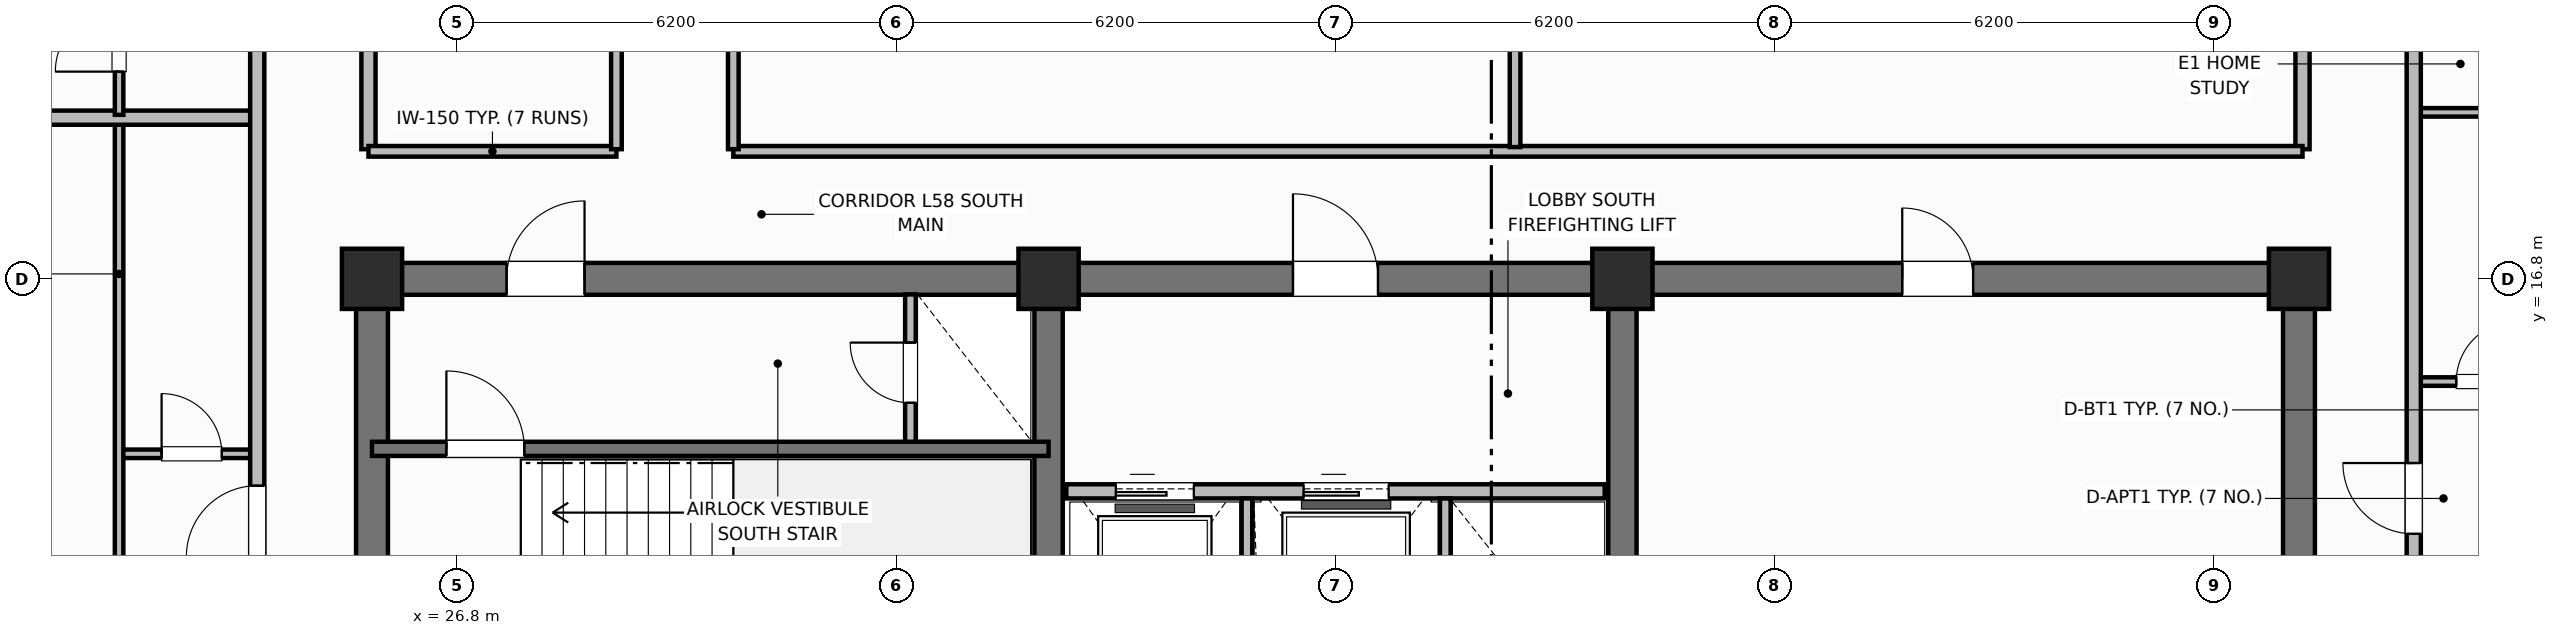
"""IFC4 building model, lengths in metres.
Left out: names, types, materials, properties, quantities, classifications, styles, units other than length and angle.
Written with IfcOpenShell. Run it as: python <this file> out.ifc"""

import sys

from ifc_helpers import new_model, si_unit, direction, frame, frame_2d, origin, origin_2d, place, context, subcontext, project, spatial, rectangle, extrude, element, fill, save


model = new_model("IFC4")
c1 = context("Model", 3, precision=1e-05, world=origin(), true_north=direction((0.0, 1.0)))
c2 = subcontext(c1, "Body", "Model", "MODEL_VIEW")
j1 = project(units=[si_unit("LENGTHUNIT", "METRE"), si_unit("PLANEANGLEUNIT", "RADIAN")], contexts=[c1])
p1 = place(None, origin())
s1 = spatial("IfcSite", under=j1, at=p1, CompositionType="ELEMENT")
p2 = place(p1, origin())
s2 = spatial("IfcBuilding", under=s1, at=p2, CompositionType="ELEMENT")
p3 = place(p2, frame((0.0, 0.0, 233.2)))
s3 = spatial("IfcBuildingStorey", under=s2, at=p3, CompositionType="ELEMENT", Elevation=233.2)
for number, where, z_axis, x_axis in (
    (1, (25.6, 10.825, 0.0), (0.0, 0.0, 1.0), (0.0, 1.0, 0.0)),
    (2, (52.8, 10.825, 0.0), (0.0, 0.0, 1.0), (0.0, 1.0, 0.0)),
):
    element("IfcWall", number, at=place(p3, frame(where, z_axis=z_axis, x_axis=x_axis)), inside=s3, PredefinedType="SHEAR", context=c2, shape_type="SweptSolid", body=[
        extrude(rectangle(XDim=5.75, YDim=0.45, at=frame_2d((2.875, 0.0))), origin(), (0.0, 0.0, 1.0), 3.7),
    ])
p4 = place(p3, frame((25.6, 16.8, 0.0), z_axis=(0.0, 0.0, 1.0), x_axis=(1.0, 0.0, 0.0)))
e3 = element("IfcWall", 3, at=p4, inside=s3, PredefinedType="SHEAR", context=c2, shape_type="SweptSolid", body=[
    extrude(rectangle(XDim=27.2, YDim=0.45, at=frame_2d((13.6, 0.0))), origin(), (0.0, 0.0, 1.0), 3.7),
])
p5 = place(p4, frame((1.9, 0.0, 0.0)))
e4 = element("IfcOpeningElement", 4, at=p5, cuts=e3, PredefinedType="OPENING", context=c2, shape_type="SweptSolid", body=[
    extrude(rectangle(XDim=1.1, YDim=2.15, at=frame_2d((0.55, 1.075))), frame((0.0, 0.235, 0.0), z_axis=(0.0, -1.0, 0.0), x_axis=(1.0, 0.0, 0.0)), (0.0, 0.0, 1.0), 0.47),
])
p6 = place(p4, frame((13.0, 0.0, 0.0)))
e5 = element("IfcOpeningElement", 5, at=p6, cuts=e3, PredefinedType="OPENING", context=c2, shape_type="SweptSolid", body=[
    extrude(rectangle(XDim=1.2, YDim=2.15, at=frame_2d((0.6, 1.075))), frame((0.0, 0.235, 0.0), z_axis=(0.0, -1.0, 0.0), x_axis=(1.0, 0.0, 0.0)), (0.0, 0.0, 1.0), 0.47),
])
p7 = place(p4, frame((21.6, 0.0, 0.0)))
e6 = element("IfcOpeningElement", 6, at=p7, cuts=e3, PredefinedType="OPENING", context=c2, shape_type="SweptSolid", body=[
    extrude(rectangle(XDim=1.0, YDim=2.15, at=frame_2d((0.5, 1.075))), frame((0.0, 0.235, 0.0), z_axis=(0.0, -1.0, 0.0), x_axis=(1.0, 0.0, 0.0)), (0.0, 0.0, 1.0), 0.47),
])
for number, where, z_axis, x_axis in (
    (7, (35.15, 10.825, 0.0), (0.0, 0.0, 1.0), (0.0, 1.0, 0.0)),
    (8, (43.25, 10.825, 0.0), (0.0, 0.0, 1.0), (0.0, 1.0, 0.0)),
):
    element("IfcWall", number, at=place(p3, frame(where, z_axis=z_axis, x_axis=x_axis)), inside=s3, PredefinedType="SHEAR", context=c2, shape_type="SweptSolid", body=[
        extrude(rectangle(XDim=5.75, YDim=0.4, at=frame_2d((2.875, 0.0))), origin(), (0.0, 0.0, 1.0), 3.7),
    ])
for number, where, z_axis, x_axis in (
    (9, (25.6, 16.8, 0.0), (0.0, 0.0, 1.0), (1.0, 0.0, 0.0)),
    (10, (35.15, 16.8, 0.0), (0.0, 0.0, 1.0), (1.0, 0.0, 0.0)),
    (11, (43.25, 16.8, 0.0), (0.0, 0.0, 1.0), (1.0, 0.0, 0.0)),
    (12, (52.8, 16.8, 0.0), (0.0, 0.0, 1.0), (1.0, 0.0, 0.0)),
):
    element("IfcColumn", number, at=place(p3, frame(where, z_axis=z_axis, x_axis=x_axis)), inside=s3, PredefinedType="COLUMN", context=c2, shape_type="SweptSolid", body=[
        extrude(rectangle(XDim=0.85, YDim=0.85, at=origin_2d()), origin(), (0.0, 0.0, 1.0), 3.7),
    ])
p8 = place(p3, frame((25.6, 14.4, 0.0), z_axis=(0.0, 0.0, 1.0), x_axis=(1.0, 0.0, 0.0)))
e13 = element("IfcWall", 13, at=p8, inside=s3, PredefinedType="SHEAR", context=c2, shape_type="SweptSolid", body=[
    extrude(rectangle(XDim=9.55, YDim=0.2, at=frame_2d((4.775, 0.0))), origin(), (0.0, 0.0, 1.0), 3.7),
])
p9 = place(p8, frame((1.05, 0.0, 0.0)))
e14 = element("IfcOpeningElement", 14, at=p9, cuts=e13, PredefinedType="OPENING", context=c2, shape_type="SweptSolid", body=[
    extrude(rectangle(XDim=1.1, YDim=2.15, at=frame_2d((0.55, 1.075))), frame((0.0, 0.11, 0.0), z_axis=(0.0, -1.0, 0.0), x_axis=(1.0, 0.0, 0.0)), (0.0, 0.0, 1.0), 0.22),
])
p10 = place(p3, frame((33.2, 14.5, 0.0), z_axis=(0.0, 0.0, 1.0), x_axis=(0.0, 1.0, 0.0)))
e15 = element("IfcWall", 15, at=p10, inside=s3, PredefinedType="PARTITIONING", context=c2, shape_type="SweptSolid", body=[
    extrude(rectangle(XDim=2.08, YDim=0.15, at=frame_2d((1.04, 0.0))), origin(), (0.0, 0.0, 1.0), 2.56),
])
p11 = place(p10, frame((0.55, 0.0, 0.0)))
e16 = element("IfcOpeningElement", 16, at=p11, cuts=e15, PredefinedType="OPENING", context=c2, shape_type="SweptSolid", body=[
    extrude(rectangle(XDim=0.85, YDim=2.05, at=frame_2d((0.425, 1.025))), frame((0.0, 0.085, 0.0), z_axis=(0.0, -1.0, 0.0), x_axis=(1.0, 0.0, 0.0)), (0.0, 0.0, 1.0), 0.17),
])
p12 = place(p3, frame((35.4, 13.8, 0.0), z_axis=(0.0, 0.0, 1.0), x_axis=(1.0, 0.0, 0.0)))
e17 = element("IfcWall", 17, at=p12, inside=s3, PredefinedType="PARTITIONING", context=c2, shape_type="SweptSolid", body=[
    extrude(rectangle(XDim=7.6, YDim=0.2, at=frame_2d((3.8, 0.0))), origin(), (0.0, 0.0, 1.0), 2.33),
])
p13 = place(p12, frame((0.7, 0.0, 0.0)))
e18 = element("IfcOpeningElement", 18, at=p13, cuts=e17, PredefinedType="OPENING", context=c2, shape_type="SweptSolid", body=[
    extrude(rectangle(XDim=1.1, YDim=2.15, at=frame_2d((0.55, 1.075))), frame((0.0, 0.11, 0.0), z_axis=(0.0, -1.0, 0.0), x_axis=(1.0, 0.0, 0.0)), (0.0, 0.0, 1.0), 0.22),
])
p14 = place(p12, frame((3.35, 0.0, 0.0)))
e19 = element("IfcOpeningElement", 19, at=p14, cuts=e17, PredefinedType="OPENING", context=c2, shape_type="SweptSolid", body=[
    extrude(rectangle(XDim=1.2, YDim=2.15, at=frame_2d((0.6, 1.075))), frame((0.0, 0.11, 0.0), z_axis=(0.0, -1.0, 0.0), x_axis=(1.0, 0.0, 0.0)), (0.0, 0.0, 1.0), 0.22),
])
for number, where, z_axis, x_axis in (
    (20, (37.95, 10.95, 0.0), (0.0, 0.0, 1.0), (0.0, 1.0, 0.0)),
    (21, (40.75, 10.95, 0.0), (0.0, 0.0, 1.0), (0.0, 1.0, 0.0)),
):
    element("IfcWall", number, at=place(p3, frame(where, z_axis=z_axis, x_axis=x_axis)), inside=s3, PredefinedType="PARTITIONING", context=c2, shape_type="SweptSolid", body=[
        extrude(rectangle(XDim=2.75, YDim=0.15, at=frame_2d((1.375, 0.0))), origin(), (0.0, 0.0, 1.0), 2.56),
    ])
for number, where, z_axis, x_axis in (
    (22, (25.55, 18.63, 0.0), (0.0, 0.0, 1.0), (0.0, 1.0, 0.0)),
    (23, (52.85, 18.63, 0.0), (0.0, 0.0, 1.0), (0.0, 1.0, 0.0)),
):
    element("IfcWall", number, at=place(p3, frame(where, z_axis=z_axis, x_axis=x_axis)), inside=s3, PredefinedType="PARTITIONING", context=c2, shape_type="SweptSolid", body=[
        extrude(rectangle(XDim=19.14, YDim=0.2, at=frame_2d((9.57, 0.0))), origin(), (0.0, 0.0, 1.0), 2.56),
    ])
p15 = place(p3, frame((25.55, 18.6, 0.0), z_axis=(0.0, 0.0, 1.0), x_axis=(1.0, 0.0, 0.0)))
e24 = element("IfcWall", 24, at=p15, inside=s3, PredefinedType="PARTITIONING", context=c2, shape_type="SweptSolid", body=[
    extrude(rectangle(XDim=3.5, YDim=0.15, at=frame_2d((1.75, 0.0))), origin(), (0.0, 0.0, 1.0), 2.56),
])
p16 = place(p3, frame((30.7, 18.6, 0.0), z_axis=(0.0, 0.0, 1.0), x_axis=(1.0, 0.0, 0.0)))
e25 = element("IfcWall", 25, at=p16, inside=s3, PredefinedType="PARTITIONING", context=c2, shape_type="SweptSolid", body=[
    extrude(rectangle(XDim=22.15, YDim=0.15, at=frame_2d((11.075, 0.0))), origin(), (0.0, 0.0, 1.0), 2.56),
])
p17 = place(p3, frame((41.735, 18.66, 0.0), z_axis=(0.0, 0.0, 1.0), x_axis=(0.0, 1.0, 0.0)))
e26 = element("IfcWall", 26, at=p17, inside=s3, PredefinedType="PARTITIONING", context=c2, shape_type="SweptSolid", body=[
    extrude(rectangle(XDim=19.08, YDim=0.15, at=frame_2d((9.54, 0.0))), origin(), (0.0, 0.0, 1.0), 2.56),
])
p18 = place(p17, frame((6.5, 0.0, 0.0)))
e27 = element("IfcOpeningElement", 27, at=p18, cuts=e26, PredefinedType="OPENING", context=c2, shape_type="SweptSolid", body=[
    extrude(rectangle(XDim=1.0, YDim=2.15, at=frame_2d((0.5, 1.075))), frame((0.0, 0.085, 0.0), z_axis=(0.0, -1.0, 0.0), x_axis=(1.0, 0.0, 0.0)), (0.0, 0.0, 1.0), 0.17),
])
p19 = place(p3, frame((29.05, 18.63, 0.0), z_axis=(0.0, 0.0, 1.0), x_axis=(0.0, 1.0, 0.0)))
e28 = element("IfcWall", 28, at=p19, inside=s3, PredefinedType="PARTITIONING", context=c2, shape_type="SweptSolid", body=[
    extrude(rectangle(XDim=19.14, YDim=0.15, at=frame_2d((9.57, 0.0))), origin(), (0.0, 0.0, 1.0), 2.56),
])
p20 = place(p19, frame((5.5, 0.0, 0.0)))
e29 = element("IfcOpeningElement", 29, at=p20, cuts=e28, PredefinedType="OPENING", context=c2, shape_type="SweptSolid", body=[
    extrude(rectangle(XDim=1.0, YDim=2.15, at=frame_2d((0.5, 1.075))), frame((0.0, 0.085, 0.0), z_axis=(0.0, -1.0, 0.0), x_axis=(1.0, 0.0, 0.0)), (0.0, 0.0, 1.0), 0.17),
])
p21 = place(p3, frame((30.7, 18.63, 0.0), z_axis=(0.0, 0.0, 1.0), x_axis=(0.0, 1.0, 0.0)))
e30 = element("IfcWall", 30, at=p21, inside=s3, PredefinedType="PARTITIONING", context=c2, shape_type="SweptSolid", body=[
    extrude(rectangle(XDim=19.14, YDim=0.15, at=frame_2d((9.57, 0.0))), origin(), (0.0, 0.0, 1.0), 2.56),
])
p22 = place(p21, frame((5.5, 0.0, 0.0)))
e31 = element("IfcOpeningElement", 31, at=p22, cuts=e30, PredefinedType="OPENING", context=c2, shape_type="SweptSolid", body=[
    extrude(rectangle(XDim=1.0, YDim=2.15, at=frame_2d((0.5, 1.075))), frame((0.0, 0.085, 0.0), z_axis=(0.0, -1.0, 0.0), x_axis=(1.0, 0.0, 0.0)), (0.0, 0.0, 1.0), 0.17),
])
p23 = place(p3, frame((22.03, 14.33, 0.0), z_axis=(0.0, 0.0, 1.0), x_axis=(1.0, 0.0, 0.0)))
e32 = element("IfcWall", 32, at=p23, inside=s3, PredefinedType="PARTITIONING", context=c2, shape_type="SweptSolid", body=[
    extrude(rectangle(XDim=1.95, YDim=0.12, at=frame_2d((0.975, 0.0))), origin(), (0.0, 0.0, 1.0), 2.56),
])
p24 = place(p23, frame((0.6, 0.0, 0.0)))
e33 = element("IfcOpeningElement", 33, at=p24, cuts=e32, PredefinedType="OPENING", context=c2, shape_type="SweptSolid", body=[
    extrude(rectangle(XDim=0.85, YDim=2.1, at=frame_2d((0.425, 1.05))), frame((0.0, 0.07, 0.0), z_axis=(0.0, -1.0, 0.0), x_axis=(1.0, 0.0, 0.0)), (0.0, 0.0, 1.0), 0.14),
])
p25 = place(p3, frame((22.03, 9.99, 0.0), z_axis=(0.0, 0.0, 1.0), x_axis=(0.0, 1.0, 0.0)))
e34 = element("IfcWall", 34, at=p25, inside=s3, PredefinedType="PARTITIONING", context=c2, shape_type="SweptSolid", body=[
    extrude(rectangle(XDim=9.045, YDim=0.12, at=frame_2d((4.522, 0.0))), origin(), (0.0, 0.0, 1.0), 2.56),
])
p26 = place(p25, frame((0.41, 0.0, 0.0)))
e35 = element("IfcOpeningElement", 35, at=p26, cuts=e34, PredefinedType="OPENING", context=c2, shape_type="SweptSolid", body=[
    extrude(rectangle(XDim=0.9, YDim=2.1, at=frame_2d((0.45, 1.05))), frame((0.0, 0.07, 0.0), z_axis=(0.0, -1.0, 0.0), x_axis=(1.0, 0.0, 0.0)), (0.0, 0.0, 1.0), 0.14),
])
p27 = place(p3, frame((19.53, 19.075, 0.0), z_axis=(0.0, 0.0, 1.0), x_axis=(1.0, 0.0, 0.0)))
e36 = element("IfcWall", 36, at=p27, inside=s3, PredefinedType="PARTITIONING", context=c2, shape_type="SweptSolid", body=[
    extrude(rectangle(XDim=4.45, YDim=0.2, at=frame_2d((2.225, 0.0))), origin(), (0.0, 0.0, 1.0), 2.56),
])
p28 = place(p3, frame((22.03, 19.115, 0.0), z_axis=(0.0, 0.0, 1.0), x_axis=(0.0, 1.0, 0.0)))
e37 = element("IfcWall", 37, at=p28, inside=s3, PredefinedType="PARTITIONING", context=c2, shape_type="SweptSolid", body=[
    extrude(rectangle(XDim=5.42, YDim=0.12, at=frame_2d((2.71, 0.0))), origin(), (0.0, 0.0, 1.0), 2.56),
])
p29 = place(p28, frame((0.61, 0.0, 0.0)))
e38 = element("IfcOpeningElement", 38, at=p29, cuts=e37, PredefinedType="OPENING", context=c2, shape_type="SweptSolid", body=[
    extrude(rectangle(XDim=0.9, YDim=2.1, at=frame_2d((0.45, 1.05))), frame((0.0, 0.07, 0.0), z_axis=(0.0, -1.0, 0.0), x_axis=(1.0, 0.0, 0.0)), (0.0, 0.0, 1.0), 0.14),
])
p30 = place(p3, frame((23.98, 9.95, 0.0), z_axis=(0.0, 0.0, 1.0), x_axis=(0.0, 1.0, 0.0)))
e39 = element("IfcWall", 39, at=p30, inside=s3, PredefinedType="PARTITIONING", context=c2, shape_type="SweptSolid", body=[
    extrude(rectangle(XDim=36.5, YDim=0.2, at=frame_2d((18.25, 0.0))), origin(), (0.0, 0.0, 1.0), 2.56),
])
p31 = place(p30, frame((2.93, 0.0, 0.0)))
e40 = element("IfcOpeningElement", 40, at=p31, cuts=e39, PredefinedType="OPENING", context=c2, shape_type="SweptSolid", body=[
    extrude(rectangle(XDim=1.0, YDim=2.15, at=frame_2d((0.5, 1.075))), frame((0.0, 0.11, 0.0), z_axis=(0.0, -1.0, 0.0), x_axis=(1.0, 0.0, 0.0)), (0.0, 0.0, 1.0), 0.22),
])
p32 = place(p30, frame((10.525, 0.0, 0.0)))
e41 = element("IfcOpeningElement", 41, at=p32, cuts=e39, PredefinedType="OPENING", context=c2, shape_type="SweptSolid", body=[
    extrude(rectangle(XDim=1.0, YDim=2.15, at=frame_2d((0.5, 1.075))), frame((0.0, 0.11, 0.0), z_axis=(0.0, -1.0, 0.0), x_axis=(1.0, 0.0, 0.0)), (0.0, 0.0, 1.0), 0.22),
])
p33 = place(p30, frame((15.175, 0.0, 0.0)))
e42 = element("IfcOpeningElement", 42, at=p33, cuts=e39, PredefinedType="OPENING", context=c2, shape_type="SweptSolid", body=[
    extrude(rectangle(XDim=1.0, YDim=2.15, at=frame_2d((0.5, 1.075))), frame((0.0, 0.11, 0.0), z_axis=(0.0, -1.0, 0.0), x_axis=(1.0, 0.0, 0.0)), (0.0, 0.0, 1.0), 0.22),
])
p34 = place(p30, frame((27.925, 0.0, 0.0)))
e43 = element("IfcOpeningElement", 43, at=p34, cuts=e39, PredefinedType="OPENING", context=c2, shape_type="SweptSolid", body=[
    extrude(rectangle(XDim=1.0, YDim=2.15, at=frame_2d((0.5, 1.075))), frame((0.0, 0.11, 0.0), z_axis=(0.0, -1.0, 0.0), x_axis=(1.0, 0.0, 0.0)), (0.0, 0.0, 1.0), 0.22),
])
p35 = place(p3, frame((54.42, 15.35, 0.0), z_axis=(0.0, 0.0, 1.0), x_axis=(1.0, 0.0, 0.0)))
e44 = element("IfcWall", 44, at=p35, inside=s3, PredefinedType="PARTITIONING", context=c2, shape_type="SweptSolid", body=[
    extrude(rectangle(XDim=1.95, YDim=0.12, at=frame_2d((0.975, 0.0))), origin(), (0.0, 0.0, 1.0), 2.56),
])
p36 = place(p35, frame((0.6, 0.0, 0.0)))
e45 = element("IfcOpeningElement", 45, at=p36, cuts=e44, PredefinedType="OPENING", context=c2, shape_type="SweptSolid", body=[
    extrude(rectangle(XDim=0.85, YDim=2.1, at=frame_2d((0.425, 1.05))), frame((0.0, 0.07, 0.0), z_axis=(0.0, -1.0, 0.0), x_axis=(1.0, 0.0, 0.0)), (0.0, 0.0, 1.0), 0.14),
])
p37 = place(p3, frame((54.42, 19.15, 0.0), z_axis=(0.0, 0.0, 1.0), x_axis=(1.0, 0.0, 0.0)))
e46 = element("IfcWall", 46, at=p37, inside=s3, PredefinedType="PARTITIONING", context=c2, shape_type="SweptSolid", body=[
    extrude(rectangle(XDim=1.95, YDim=0.12, at=frame_2d((0.975, 0.0))), origin(), (0.0, 0.0, 1.0), 2.56),
])
p38 = place(p3, frame((54.42, 9.95, 0.0), z_axis=(0.0, 0.0, 1.0), x_axis=(0.0, 1.0, 0.0)))
e47 = element("IfcWall", 47, at=p38, inside=s3, PredefinedType="PARTITIONING", context=c2, shape_type="SweptSolid", body=[
    extrude(rectangle(XDim=36.5, YDim=0.2, at=frame_2d((18.25, 0.0))), origin(), (0.0, 0.0, 1.0), 2.56),
])
p39 = place(p38, frame((3.25, 0.0, 0.0)))
e48 = element("IfcOpeningElement", 48, at=p39, cuts=e47, PredefinedType="OPENING", context=c2, shape_type="SweptSolid", body=[
    extrude(rectangle(XDim=1.0, YDim=2.15, at=frame_2d((0.5, 1.075))), frame((0.0, 0.11, 0.0), z_axis=(0.0, -1.0, 0.0), x_axis=(1.0, 0.0, 0.0)), (0.0, 0.0, 1.0), 0.22),
])
p40 = place(p38, frame((12.96, 0.0, 0.0)))
e49 = element("IfcOpeningElement", 49, at=p40, cuts=e47, PredefinedType="OPENING", context=c2, shape_type="SweptSolid", body=[
    extrude(rectangle(XDim=1.0, YDim=2.15, at=frame_2d((0.5, 1.075))), frame((0.0, 0.11, 0.0), z_axis=(0.0, -1.0, 0.0), x_axis=(1.0, 0.0, 0.0)), (0.0, 0.0, 1.0), 0.22),
])
p41 = place(p38, frame((24.3, 0.0, 0.0)))
e50 = element("IfcOpeningElement", 50, at=p41, cuts=e47, PredefinedType="OPENING", context=c2, shape_type="SweptSolid", body=[
    extrude(rectangle(XDim=1.0, YDim=2.15, at=frame_2d((0.5, 1.075))), frame((0.0, 0.11, 0.0), z_axis=(0.0, -1.0, 0.0), x_axis=(1.0, 0.0, 0.0)), (0.0, 0.0, 1.0), 0.22),
])
p42 = place(p9, origin())
e51 = element("IfcDoor", 51, at=p42, inside=s3, OperationType="SINGLE_SWING_LEFT", PredefinedType="DOOR", context=c2, shape_type="SweptSolid", body=[
    extrude(rectangle(XDim=1.1, YDim=2.15, at=frame_2d((0.55, 1.075))), frame((0.0, 0.025, 0.0), z_axis=(0.0, -1.0, 0.0), x_axis=(1.0, 0.0, 0.0)), (0.0, 0.0, 1.0), 0.05),
])
fill(e14, e51)
p43 = place(p11, origin())
e52 = element("IfcDoor", 52, at=p43, inside=s3, OperationType="SINGLE_SWING_RIGHT", PredefinedType="TRAPDOOR", context=c2, shape_type="SweptSolid", body=[
    extrude(rectangle(XDim=0.85, YDim=2.05, at=frame_2d((0.425, 1.025))), frame((0.0, 0.025, 0.0), z_axis=(0.0, -1.0, 0.0), x_axis=(1.0, 0.0, 0.0)), (0.0, 0.0, 1.0), 0.05),
])
fill(e16, e52)
p44 = place(p13, origin())
e53 = element("IfcDoor", 53, at=p44, inside=s3, OperationType="SLIDING_TO_LEFT", PredefinedType="DOOR", context=c2, shape_type="SweptSolid", body=[
    extrude(rectangle(XDim=1.1, YDim=2.15, at=frame_2d((0.55, 1.075))), frame((0.0, 0.025, 0.0), z_axis=(0.0, -1.0, 0.0), x_axis=(1.0, 0.0, 0.0)), (0.0, 0.0, 1.0), 0.05),
])
fill(e18, e53)
p45 = place(p14, origin())
e54 = element("IfcDoor", 54, at=p45, inside=s3, OperationType="SLIDING_TO_LEFT", PredefinedType="DOOR", context=c2, shape_type="SweptSolid", body=[
    extrude(rectangle(XDim=1.2, YDim=2.15, at=frame_2d((0.6, 1.075))), frame((0.0, 0.025, 0.0), z_axis=(0.0, -1.0, 0.0), x_axis=(1.0, 0.0, 0.0)), (0.0, 0.0, 1.0), 0.05),
])
fill(e19, e54)
p46 = place(p24, origin())
e55 = element("IfcDoor", 55, at=p46, inside=s3, OperationType="SINGLE_SWING_LEFT", PredefinedType="DOOR", context=c2, shape_type="SweptSolid", body=[
    extrude(rectangle(XDim=0.85, YDim=2.1, at=frame_2d((0.425, 1.05))), frame((0.0, 0.025, 0.0), z_axis=(0.0, -1.0, 0.0), x_axis=(1.0, 0.0, 0.0)), (0.0, 0.0, 1.0), 0.05),
])
fill(e33, e55)
p47 = place(p29, origin())
e56 = element("IfcDoor", 56, at=p47, inside=s3, OperationType="SINGLE_SWING_LEFT", PredefinedType="DOOR", context=c2, shape_type="SweptSolid", body=[
    extrude(rectangle(XDim=0.9, YDim=2.1, at=frame_2d((0.45, 1.05))), frame((0.0, 0.025, 0.0), z_axis=(0.0, -1.0, 0.0), x_axis=(1.0, 0.0, 0.0)), (0.0, 0.0, 1.0), 0.05),
])
fill(e38, e56)
p48 = place(p31, origin())
e57 = element("IfcDoor", 57, at=p48, inside=s3, OperationType="SINGLE_SWING_LEFT", PredefinedType="DOOR", context=c2, shape_type="SweptSolid", body=[
    extrude(rectangle(XDim=1.0, YDim=2.15, at=frame_2d((0.5, 1.075))), frame((0.0, 0.025, 0.0), z_axis=(0.0, -1.0, 0.0), x_axis=(1.0, 0.0, 0.0)), (0.0, 0.0, 1.0), 0.05),
])
fill(e40, e57)
p49 = place(p36, origin())
e58 = element("IfcDoor", 58, at=p49, inside=s3, OperationType="SINGLE_SWING_RIGHT", PredefinedType="DOOR", context=c2, shape_type="SweptSolid", body=[
    extrude(rectangle(XDim=0.85, YDim=2.1, at=frame_2d((0.425, 1.05))), frame((0.0, 0.025, 0.0), z_axis=(0.0, -1.0, 0.0), x_axis=(1.0, 0.0, 0.0)), (0.0, 0.0, 1.0), 0.05),
])
fill(e45, e58)
p50 = place(p39, origin())
e59 = element("IfcDoor", 59, at=p50, inside=s3, OperationType="SINGLE_SWING_RIGHT", PredefinedType="DOOR", context=c2, shape_type="SweptSolid", body=[
    extrude(rectangle(XDim=1.0, YDim=2.15, at=frame_2d((0.5, 1.075))), frame((0.0, 0.025, 0.0), z_axis=(0.0, -1.0, 0.0), x_axis=(1.0, 0.0, 0.0)), (0.0, 0.0, 1.0), 0.05),
])
fill(e48, e59)
p51 = place(p5, origin())
e60 = element("IfcDoor", 60, at=p51, inside=s3, OperationType="SINGLE_SWING_RIGHT", PredefinedType="DOOR", context=c2, shape_type="SweptSolid", body=[
    extrude(rectangle(XDim=1.1, YDim=2.15, at=frame_2d((0.55, 1.075))), frame((0.0, 0.025, 0.0), z_axis=(0.0, -1.0, 0.0), x_axis=(1.0, 0.0, 0.0)), (0.0, 0.0, 1.0), 0.05),
])
fill(e4, e60)
p52 = place(p6, origin())
e61 = element("IfcDoor", 61, at=p52, inside=s3, OperationType="SINGLE_SWING_LEFT", PredefinedType="DOOR", context=c2, shape_type="SweptSolid", body=[
    extrude(rectangle(XDim=1.2, YDim=2.15, at=frame_2d((0.6, 1.075))), frame((0.0, 0.025, 0.0), z_axis=(0.0, -1.0, 0.0), x_axis=(1.0, 0.0, 0.0)), (0.0, 0.0, 1.0), 0.05),
])
fill(e5, e61)
p53 = place(p7, origin())
e62 = element("IfcDoor", 62, at=p53, inside=s3, OperationType="SINGLE_SWING_LEFT", PredefinedType="DOOR", context=c2, shape_type="SweptSolid", body=[
    extrude(rectangle(XDim=1.0, YDim=2.15, at=frame_2d((0.5, 1.075))), frame((0.0, 0.025, 0.0), z_axis=(0.0, -1.0, 0.0), x_axis=(1.0, 0.0, 0.0)), (0.0, 0.0, 1.0), 0.05),
])
fill(e6, e62)
save(model, sys.argv[1])
